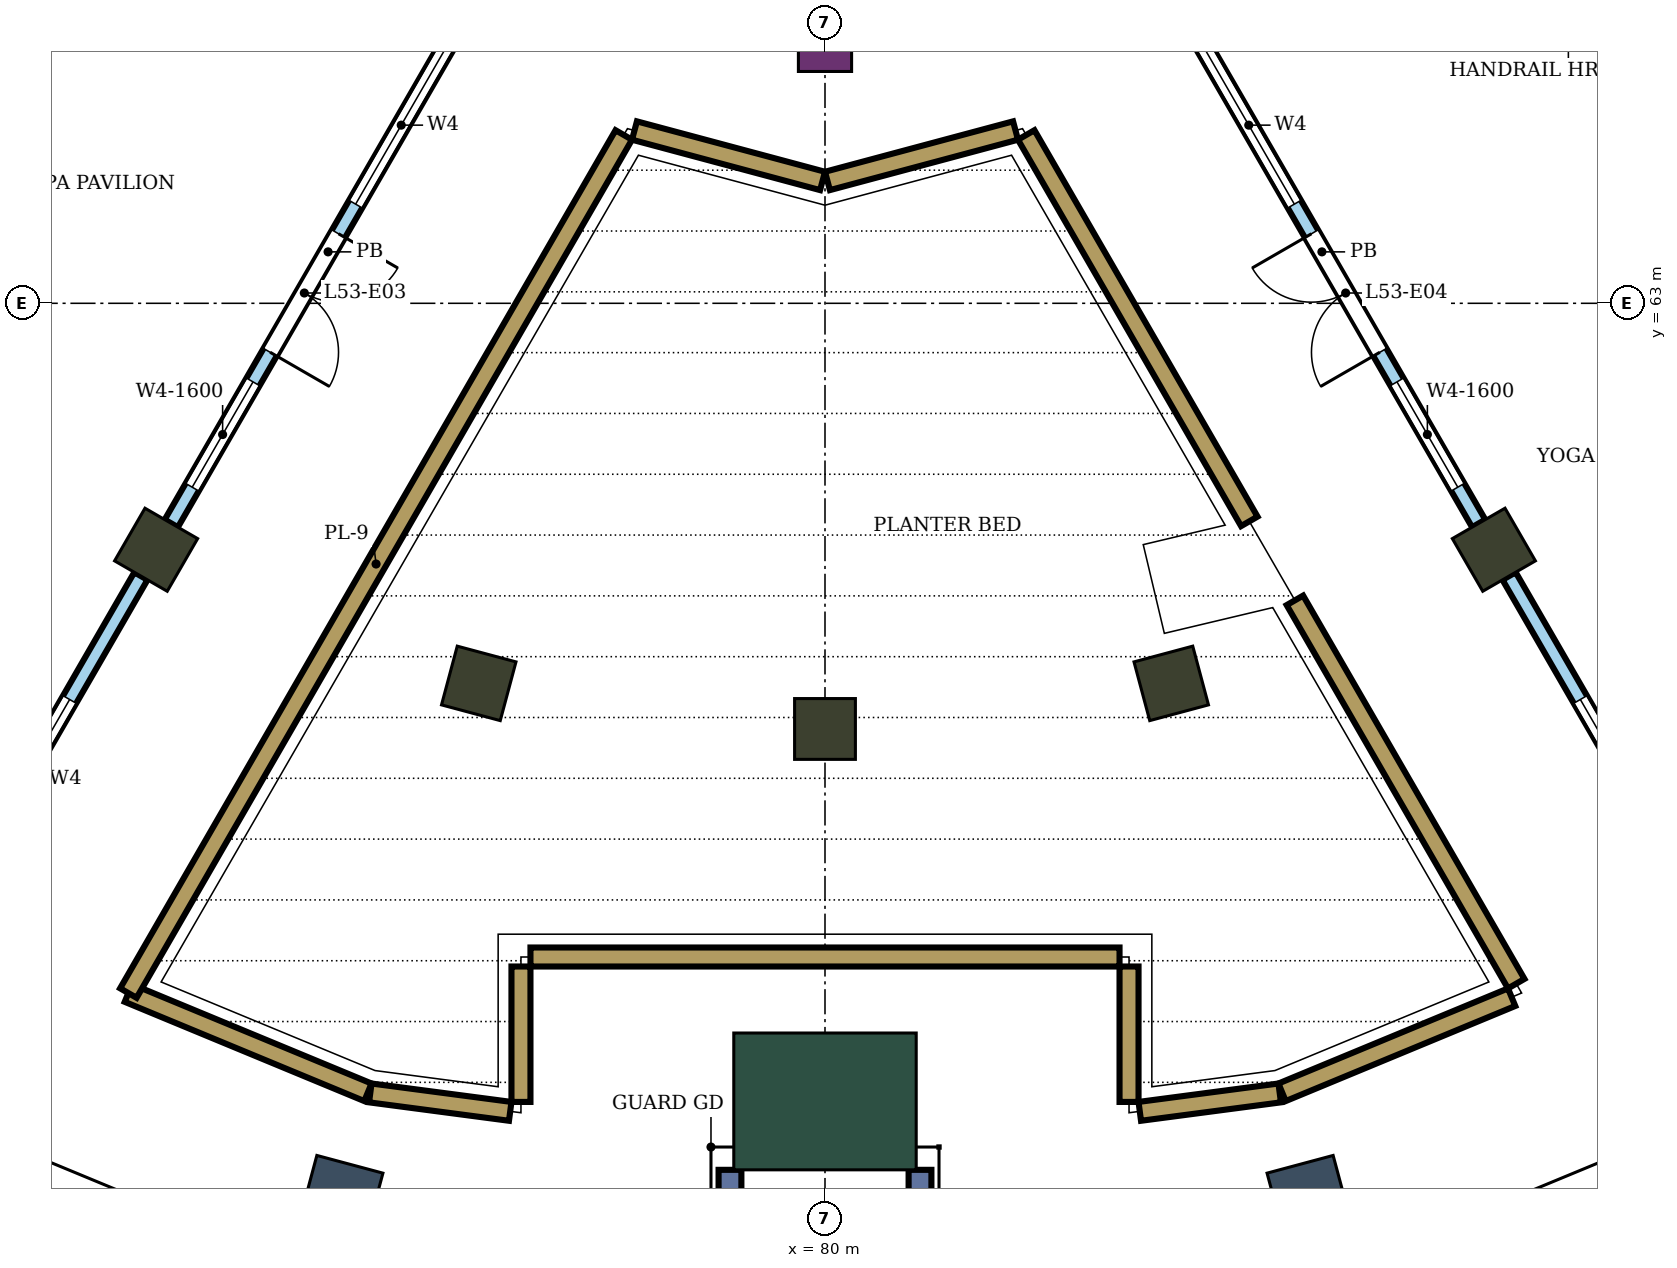
"""IFC4 building model, lengths in metres.
Left out: names, types, materials, properties, quantities, classifications, styles, units other than length and angle.
Written with IfcOpenShell. Run it as: python <this file> out.ifc"""

import sys

from ifc_helpers import new_model, si_unit, direction, frame, frame_2d, origin, origin_2d, place, context, subcontext, project, spatial, rectangle, extrude, element, fill, save


model = new_model("IFC4")
c1 = context("Model", 3, precision=1e-05, world=origin(), true_north=direction((0.0, 1.0)))
c2 = subcontext(c1, "Body", "Model", "MODEL_VIEW")
j1 = project(units=[si_unit("LENGTHUNIT", "METRE"), si_unit("PLANEANGLEUNIT", "RADIAN")], contexts=[c1])
p1 = place(None, origin())
s1 = spatial("IfcSite", under=j1, at=p1, CompositionType="ELEMENT")
p2 = place(p1, origin())
s2 = spatial("IfcBuilding", under=s1, at=p2, CompositionType="ELEMENT")
p3 = place(p2, frame((0.0, 0.0, 229.3)))
s3 = spatial("IfcBuildingStorey", under=s2, at=p3, CompositionType="ELEMENT", Elevation=229.3)
for number, where, z_axis, x_axis in (
    (1, (73.633, 51.238, 0.0), (0.0, 0.0, 1.0), (-0.259, -0.966, 0.0)),
    (2, (86.367, 51.238, 0.0), (0.0, 0.0, 1.0), (0.259, -0.966, 0.0)),
):
    element("IfcColumn", number, at=place(p3, frame(where, z_axis=z_axis, x_axis=x_axis)), inside=s3, PredefinedType="COLUMN", context=c2, shape_type="SweptSolid", body=[
        extrude(rectangle(XDim=0.9, YDim=0.9, at=origin_2d()), origin(), (0.0, 0.0, 1.0), 8.0),
    ])
for number, where, z_axis, x_axis in (
    (3, (71.2, 59.758, 0.0), (0.0, 0.0, 1.0), (-0.5, -0.866, 0.0)),
    (4, (75.445, 58.0, 0.0), (0.0, 0.0, 1.0), (-0.259, -0.966, 0.0)),
    (5, (80.0, 57.4, 0.0), (0.0, 0.0, 1.0), (0.0, -1.0, 0.0)),
    (6, (84.555, 58.0, 0.0), (0.0, 0.0, 1.0), (0.259, -0.966, 0.0)),
    (7, (88.8, 59.758, 0.0), (0.0, 0.0, 1.0), (0.5, -0.866, 0.0)),
):
    element("IfcColumn", number, at=place(p3, frame(where, z_axis=z_axis, x_axis=x_axis)), inside=s3, PredefinedType="COLUMN", context=c2, shape_type="SweptSolid", body=[
        extrude(rectangle(XDim=0.8, YDim=0.8, at=origin_2d()), origin(), (0.0, 0.0, 1.0), 8.0),
    ])
p4 = place(p3, frame((80.0, 66.4, 0.0), z_axis=(0.0, 0.0, 1.0), x_axis=(0.0, -1.0, 0.0)))
e8 = element("IfcColumn", 8, at=p4, inside=s3, PredefinedType="COLUMN", context=c2, shape_type="SweptSolid", body=[
    extrude(rectangle(XDim=0.7, YDim=0.7, at=origin_2d()), origin(), (0.0, 0.0, 1.0), 8.0),
])
p5 = place(p3, frame((80.0, 52.5, 0.0), z_axis=(0.0, 0.0, 1.0), x_axis=(0.0, -1.0, 0.0)))
e9 = element("IfcColumn", 9, at=p5, inside=s3, PredefinedType="COLUMN", context=c2, shape_type="SweptSolid", body=[
    extrude(rectangle(XDim=1.8, YDim=2.4, at=origin_2d()), origin(), (0.0, 0.0, 1.0), 8.0),
])
for number, where, z_axis, x_axis in (
    (10, (78.75, 51.6, 0.0), (0.0, 0.0, 1.0), (0.0, -1.0, 0.0)),
    (11, (81.25, 51.6, 0.0), (0.0, 0.0, 1.0), (0.0, -1.0, 0.0)),
):
    element("IfcWall", number, at=place(p3, frame(where, z_axis=z_axis, x_axis=x_axis)), inside=s3, PredefinedType="NOTDEFINED", context=c2, shape_type="SweptSolid", body=[
        extrude(rectangle(XDim=2.416, YDim=0.3, at=frame_2d((1.208, 0.0))), origin(), (0.0, 0.0, 1.0), 8.0),
    ])
p6 = place(p3, frame((70.835, 53.926, 0.0), z_axis=(0.0, 0.0, 1.0), x_axis=(0.923871147788, -0.38270367425, 0.0)))
e12 = element("IfcWall", 12, at=p6, inside=s3, PredefinedType="USERDEFINED", context=c2, shape_type="SweptSolid", body=[
    extrude(rectangle(XDim=3.411, YDim=0.25, at=frame_2d((1.706, 0.0))), origin(), (0.0, 0.0, 1.0), 0.6),
])
p7 = place(p3, frame((74.018, 52.612, 0.0), z_axis=(0.0, 0.0, 1.0), x_axis=(0.991436829887, -0.130587182926, 0.0)))
e13 = element("IfcWall", 13, at=p7, inside=s3, PredefinedType="USERDEFINED", context=c2, shape_type="SweptSolid", body=[
    extrude(rectangle(XDim=1.856, YDim=0.25, at=frame_2d((0.928, 0.0))), origin(), (0.0, 0.0, 1.0), 0.6),
])
p8 = place(p3, frame((76.0, 52.493, 0.0), z_axis=(0.0, 0.0, 1.0), x_axis=(0.0, 1.0, 0.0)))
e14 = element("IfcWall", 14, at=p8, inside=s3, PredefinedType="USERDEFINED", context=c2, shape_type="SweptSolid", body=[
    extrude(rectangle(XDim=1.781, YDim=0.25, at=frame_2d((0.891, 0.0))), origin(), (0.0, 0.0, 1.0), 0.6),
])
p9 = place(p3, frame((76.125, 54.4, 0.0), z_axis=(0.0, 0.0, 1.0), x_axis=(1.0, 0.0, 0.0)))
e15 = element("IfcWall", 15, at=p9, inside=s3, PredefinedType="USERDEFINED", context=c2, shape_type="SweptSolid", body=[
    extrude(rectangle(XDim=7.75, YDim=0.25, at=frame_2d((3.875, 0.0))), origin(), (0.0, 0.0, 1.0), 0.6),
])
p10 = place(p3, frame((84.0, 54.275, 0.0), z_axis=(0.0, 0.0, 1.0), x_axis=(0.0, -1.0, 0.0)))
e16 = element("IfcWall", 16, at=p10, inside=s3, PredefinedType="USERDEFINED", context=c2, shape_type="SweptSolid", body=[
    extrude(rectangle(XDim=1.781, YDim=0.25, at=frame_2d((0.891, 0.0))), origin(), (0.0, 0.0, 1.0), 0.6),
])
p11 = place(p3, frame((84.141, 52.369, 0.0), z_axis=(0.0, 0.0, 1.0), x_axis=(0.991436829887, 0.130587182926, 0.0)))
e17 = element("IfcWall", 17, at=p11, inside=s3, PredefinedType="USERDEFINED", context=c2, shape_type="SweptSolid", body=[
    extrude(rectangle(XDim=1.856, YDim=0.25, at=frame_2d((0.928, 0.0))), origin(), (0.0, 0.0, 1.0), 0.6),
])
p12 = place(p3, frame((86.014, 52.62, 0.0), z_axis=(0.0, 0.0, 1.0), x_axis=(0.923863886655, 0.382721202621, 0.0)))
e18 = element("IfcWall", 18, at=p12, inside=s3, PredefinedType="USERDEFINED", context=c2, shape_type="SweptSolid", body=[
    extrude(rectangle(XDim=3.269, YDim=0.25, at=frame_2d((1.634, 0.0))), origin(), (0.0, 0.0, 1.0), 0.6),
])
p13 = place(p3, frame((89.094, 54.049, 0.0), z_axis=(0.0, 0.0, 1.0), x_axis=(-0.50000795037, 0.866020813587, 0.0)))
e19 = element("IfcWall", 19, at=p13, inside=s3, PredefinedType="USERDEFINED", context=c2, shape_type="SweptSolid", body=[
    extrude(rectangle(XDim=5.823, YDim=0.25, at=frame_2d((2.912, 0.0))), origin(), (0.0, 0.0, 1.0), 0.6),
])
p14 = place(p3, frame((85.582, 60.131, 0.0), z_axis=(0.0, 0.0, 1.0), x_axis=(-0.499999689456, 0.866025583077, 0.0)))
e20 = element("IfcWall", 20, at=p14, inside=s3, PredefinedType="USERDEFINED", context=c2, shape_type="SweptSolid", body=[
    extrude(rectangle(XDim=5.87, YDim=0.25, at=frame_2d((2.935, 0.0))), origin(), (0.0, 0.0, 1.0), 0.6),
])
for number, where, z_axis, x_axis in (
    (21, (82.507, 65.273, 0.0), (0.0, 0.0, 1.0), (-0.966, -0.259, 0.0)),
    (22, (79.968, 64.61, 0.0), (0.0, 0.0, 1.0), (-0.966, 0.259, 0.0)),
):
    element("IfcWall", number, at=place(p3, frame(where, z_axis=z_axis, x_axis=x_axis)), inside=s3, PredefinedType="USERDEFINED", context=c2, shape_type="SweptSolid", body=[
        extrude(rectangle(XDim=2.562, YDim=0.25, at=frame_2d((1.281, 0.0))), origin(), (0.0, 0.0, 1.0), 0.6),
    ])
p15 = place(p3, frame((77.353, 65.215, 0.0), z_axis=(0.0, 0.0, 1.0), x_axis=(-0.499990498062, -0.866030889661, 0.0)))
e23 = element("IfcWall", 23, at=p15, inside=s3, PredefinedType="USERDEFINED", context=c2, shape_type="SweptSolid", body=[
    extrude(rectangle(XDim=13.035, YDim=0.25, at=frame_2d((6.518, 0.0))), origin(), (0.0, 0.0, 1.0), 0.6),
])
p16 = place(p3, frame((75.525, 67.249, 0.0), z_axis=(0.0, 0.0, 1.0), x_axis=(-0.499996545922, -0.866027397988, 0.0)))
e24 = element("IfcWall", 24, at=p16, inside=s3, PredefinedType="NOTDEFINED", context=c2, shape_type="SweptSolid", body=[
    extrude(rectangle(XDim=8.25, YDim=0.2, at=frame_2d((4.125, 0.0))), origin(), (0.0, 0.0, 1.0), 8.0),
])
p17 = place(p16, frame((1.0, 0.0, 0.3)))
e25 = element("IfcOpeningElement", 25, at=p17, cuts=e24, PredefinedType="OPENING", context=c2, shape_type="SweptSolid", body=[
    extrude(rectangle(XDim=2.4, YDim=3.6, at=frame_2d((1.2, 1.8))), frame((0.0, 0.11, 0.0), z_axis=(0.0, -1.0, 0.0), x_axis=(1.0, 0.0, 0.0)), (0.0, 0.0, 1.0), 0.22),
])
p18 = place(p16, frame((3.85, 0.0, 0.0)))
e26 = element("IfcOpeningElement", 26, at=p18, cuts=e24, PredefinedType="OPENING", context=c2, shape_type="SweptSolid", body=[
    extrude(rectangle(XDim=1.8, YDim=2.4, at=frame_2d((0.9, 1.2))), frame((0.0, 0.11, 0.0), z_axis=(0.0, -1.0, 0.0), x_axis=(1.0, 0.0, 0.0)), (0.0, 0.0, 1.0), 0.22),
])
p19 = place(p16, frame((6.1, 0.0, 0.3)))
e27 = element("IfcOpeningElement", 27, at=p19, cuts=e24, PredefinedType="OPENING", context=c2, shape_type="SweptSolid", body=[
    extrude(rectangle(XDim=1.6, YDim=3.6, at=frame_2d((0.8, 1.8))), frame((0.0, 0.11, 0.0), z_axis=(0.0, -1.0, 0.0), x_axis=(1.0, 0.0, 0.0)), (0.0, 0.0, 1.0), 0.22),
])
p20 = place(p3, frame((71.0, 59.412, 0.0), z_axis=(0.0, 0.0, 1.0), x_axis=(-0.499985903289, -0.866033542371, 0.0)))
e28 = element("IfcWall", 28, at=p20, inside=s3, PredefinedType="NOTDEFINED", context=c2, shape_type="SweptSolid", body=[
    extrude(rectangle(XDim=6.15, YDim=0.2, at=frame_2d((3.075, 0.0))), origin(), (0.0, 0.0, 1.0), 8.0),
])
p21 = place(p20, frame((1.875, 0.0, 0.3)))
e29 = element("IfcOpeningElement", 29, at=p21, cuts=e28, PredefinedType="OPENING", context=c2, shape_type="SweptSolid", body=[
    extrude(rectangle(XDim=2.4, YDim=3.6, at=frame_2d((1.2, 1.8))), frame((0.0, 0.11, 0.0), z_axis=(0.0, -1.0, 0.0), x_axis=(1.0, 0.0, 0.0)), (0.0, 0.0, 1.0), 0.22),
])
p22 = place(p3, frame((84.475, 67.249, 0.0), z_axis=(0.0, 0.0, 1.0), x_axis=(0.499996545922, -0.866027397988, 0.0)))
e30 = element("IfcWall", 30, at=p22, inside=s3, PredefinedType="NOTDEFINED", context=c2, shape_type="SweptSolid", body=[
    extrude(rectangle(XDim=8.25, YDim=0.2, at=frame_2d((4.125, 0.0))), origin(), (0.0, 0.0, 1.0), 8.0),
])
p23 = place(p22, frame((1.0, 0.0, 0.3)))
e31 = element("IfcOpeningElement", 31, at=p23, cuts=e30, PredefinedType="OPENING", context=c2, shape_type="SweptSolid", body=[
    extrude(rectangle(XDim=2.4, YDim=3.6, at=frame_2d((1.2, 1.8))), frame((0.0, 0.11, 0.0), z_axis=(0.0, -1.0, 0.0), x_axis=(1.0, 0.0, 0.0)), (0.0, 0.0, 1.0), 0.22),
])
p24 = place(p22, frame((3.85, 0.0, 0.0)))
e32 = element("IfcOpeningElement", 32, at=p24, cuts=e30, PredefinedType="OPENING", context=c2, shape_type="SweptSolid", body=[
    extrude(rectangle(XDim=1.8, YDim=2.4, at=frame_2d((0.9, 1.2))), frame((0.0, 0.11, 0.0), z_axis=(0.0, -1.0, 0.0), x_axis=(1.0, 0.0, 0.0)), (0.0, 0.0, 1.0), 0.22),
])
p25 = place(p22, frame((6.1, 0.0, 0.3)))
e33 = element("IfcOpeningElement", 33, at=p25, cuts=e30, PredefinedType="OPENING", context=c2, shape_type="SweptSolid", body=[
    extrude(rectangle(XDim=1.6, YDim=3.6, at=frame_2d((0.8, 1.8))), frame((0.0, 0.11, 0.0), z_axis=(0.0, -1.0, 0.0), x_axis=(1.0, 0.0, 0.0)), (0.0, 0.0, 1.0), 0.22),
])
p26 = place(p3, frame((89.0, 59.412, 0.0), z_axis=(0.0, 0.0, 1.0), x_axis=(0.499985903289, -0.866033542371, 0.0)))
e34 = element("IfcWall", 34, at=p26, inside=s3, PredefinedType="NOTDEFINED", context=c2, shape_type="SweptSolid", body=[
    extrude(rectangle(XDim=6.15, YDim=0.2, at=frame_2d((3.075, 0.0))), origin(), (0.0, 0.0, 1.0), 8.0),
])
p27 = place(p26, frame((1.875, 0.0, 0.3)))
e35 = element("IfcOpeningElement", 35, at=p27, cuts=e34, PredefinedType="OPENING", context=c2, shape_type="SweptSolid", body=[
    extrude(rectangle(XDim=2.4, YDim=3.6, at=frame_2d((1.2, 1.8))), frame((0.0, 0.11, 0.0), z_axis=(0.0, -1.0, 0.0), x_axis=(1.0, 0.0, 0.0)), (0.0, 0.0, 1.0), 0.22),
])
p28 = place(p17, origin())
e36 = element("IfcWindow", 36, at=p28, inside=s3, PartitioningType="SINGLE_PANEL", PredefinedType="WINDOW", context=c2, shape_type="SweptSolid", body=[
    extrude(rectangle(XDim=2.4, YDim=3.6, at=frame_2d((1.2, 1.8))), frame((0.0, 0.03, 0.0), z_axis=(0.0, -1.0, 0.0), x_axis=(1.0, 0.0, 0.0)), (0.0, 0.0, 1.0), 0.06),
])
fill(e25, e36)
p29 = place(p18, origin())
e37 = element("IfcDoor", 37, at=p29, inside=s3, OperationType="DOUBLE_DOOR_SINGLE_SWING", PredefinedType="DOOR", context=c2, shape_type="SweptSolid", body=[
    extrude(rectangle(XDim=1.8, YDim=2.4, at=frame_2d((0.9, 1.2))), frame((0.0, 0.025, 0.0), z_axis=(0.0, -1.0, 0.0), x_axis=(1.0, 0.0, 0.0)), (0.0, 0.0, 1.0), 0.05),
])
fill(e26, e37)
p30 = place(p19, origin())
e38 = element("IfcWindow", 38, at=p30, inside=s3, PartitioningType="SINGLE_PANEL", PredefinedType="WINDOW", context=c2, shape_type="SweptSolid", body=[
    extrude(rectangle(XDim=1.6, YDim=3.6, at=frame_2d((0.8, 1.8))), frame((0.0, 0.03, 0.0), z_axis=(0.0, -1.0, 0.0), x_axis=(1.0, 0.0, 0.0)), (0.0, 0.0, 1.0), 0.06),
])
fill(e27, e38)
p31 = place(p21, origin())
e39 = element("IfcWindow", 39, at=p31, inside=s3, PartitioningType="SINGLE_PANEL", PredefinedType="WINDOW", context=c2, shape_type="SweptSolid", body=[
    extrude(rectangle(XDim=2.4, YDim=3.6, at=frame_2d((1.2, 1.8))), frame((0.0, 0.03, 0.0), z_axis=(0.0, -1.0, 0.0), x_axis=(1.0, 0.0, 0.0)), (0.0, 0.0, 1.0), 0.06),
])
fill(e29, e39)
p32 = place(p23, origin())
e40 = element("IfcWindow", 40, at=p32, inside=s3, PartitioningType="SINGLE_PANEL", PredefinedType="WINDOW", context=c2, shape_type="SweptSolid", body=[
    extrude(rectangle(XDim=2.4, YDim=3.6, at=frame_2d((1.2, 1.8))), frame((0.0, 0.03, 0.0), z_axis=(0.0, -1.0, 0.0), x_axis=(1.0, 0.0, 0.0)), (0.0, 0.0, 1.0), 0.06),
])
fill(e31, e40)
p33 = place(p24, frame((1.8, 0.0, 0.0), z_axis=(0.0, 0.0, 1.0), x_axis=(-1.0, 0.0, 0.0)))
e41 = element("IfcDoor", 41, at=p33, inside=s3, OperationType="DOUBLE_DOOR_SINGLE_SWING", PredefinedType="DOOR", context=c2, shape_type="SweptSolid", body=[
    extrude(rectangle(XDim=1.8, YDim=2.4, at=frame_2d((0.9, 1.2))), frame((0.0, 0.025, 0.0), z_axis=(0.0, -1.0, 0.0), x_axis=(1.0, 0.0, 0.0)), (0.0, 0.0, 1.0), 0.05),
])
fill(e32, e41)
p34 = place(p25, origin())
e42 = element("IfcWindow", 42, at=p34, inside=s3, PartitioningType="SINGLE_PANEL", PredefinedType="WINDOW", context=c2, shape_type="SweptSolid", body=[
    extrude(rectangle(XDim=1.6, YDim=3.6, at=frame_2d((0.8, 1.8))), frame((0.0, 0.03, 0.0), z_axis=(0.0, -1.0, 0.0), x_axis=(1.0, 0.0, 0.0)), (0.0, 0.0, 1.0), 0.06),
])
fill(e33, e42)
p35 = place(p27, origin())
e43 = element("IfcWindow", 43, at=p35, inside=s3, PartitioningType="SINGLE_PANEL", PredefinedType="WINDOW", context=c2, shape_type="SweptSolid", body=[
    extrude(rectangle(XDim=2.4, YDim=3.6, at=frame_2d((1.2, 1.8))), frame((0.0, 0.03, 0.0), z_axis=(0.0, -1.0, 0.0), x_axis=(1.0, 0.0, 0.0)), (0.0, 0.0, 1.0), 0.06),
])
fill(e35, e43)
save(model, sys.argv[1])
